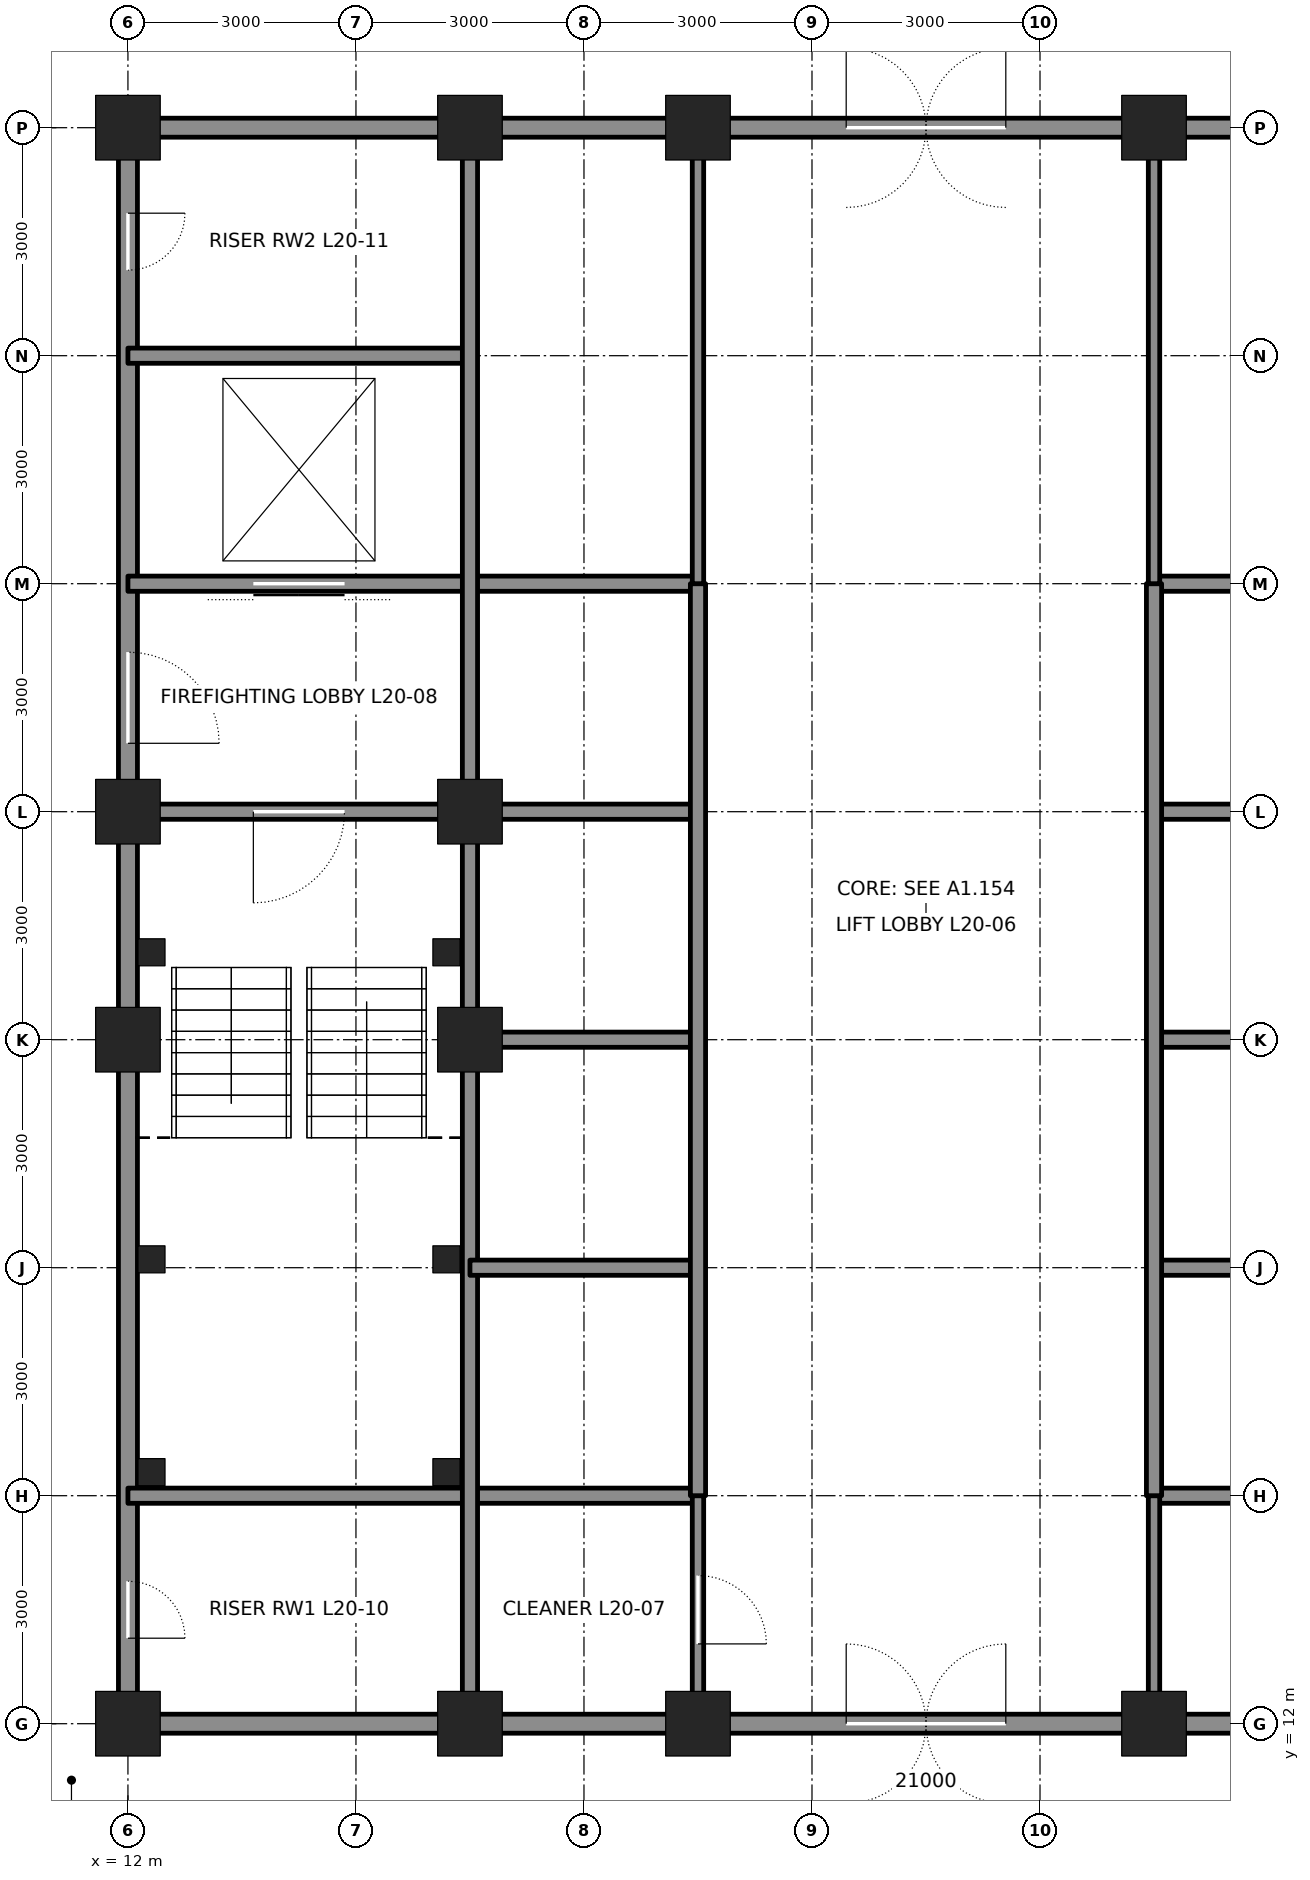
"""IFC4 building model, lengths in metres.
Left out: names, types, materials, properties, quantities, classifications, styles, units other than length and angle.
Written with IfcOpenShell. Run it as: python <this file> out.ifc"""

import sys

from ifc_helpers import new_model, si_unit, direction, frame, frame_2d, origin, origin_2d, place, context, subcontext, project, spatial, rectangle, hollow_rectangle, extrude, element, fill, save


model = new_model("IFC4")
c1 = context("Model", 3, precision=1e-05, world=origin(), true_north=direction((0.0, 1.0)))
c2 = subcontext(c1, "Body", "Model", "MODEL_VIEW")
j1 = project(units=[si_unit("LENGTHUNIT", "METRE"), si_unit("PLANEANGLEUNIT", "RADIAN")], contexts=[c1])
p1 = place(None, origin())
s1 = spatial("IfcSite", under=j1, at=p1, CompositionType="ELEMENT")
p2 = place(p1, origin())
s2 = spatial("IfcBuilding", under=s1, at=p2, CompositionType="ELEMENT")
p3 = place(p2, frame((0.0, 0.0, 96.3)))
s3 = spatial("IfcBuildingStorey", under=s2, at=p3, CompositionType="ELEMENT", Elevation=96.3)
for number, where, z_axis, x_axis in (
    (1, (12.0, 12.0, 0.0), (0.0, 0.0, 1.0), (1.0, 0.0, 0.0)),
    (2, (16.5, 12.0, 0.0), (0.0, 0.0, 1.0), (1.0, 0.0, 0.0)),
    (3, (19.5, 12.0, 0.0), (0.0, 0.0, 1.0), (1.0, 0.0, 0.0)),
    (4, (25.5, 12.0, 0.0), (0.0, 0.0, 1.0), (1.0, 0.0, 0.0)),
    (5, (12.0, 33.0, 0.0), (0.0, 0.0, 1.0), (1.0, 0.0, 0.0)),
    (6, (16.5, 33.0, 0.0), (0.0, 0.0, 1.0), (1.0, 0.0, 0.0)),
    (7, (19.5, 33.0, 0.0), (0.0, 0.0, 1.0), (1.0, 0.0, 0.0)),
    (8, (25.5, 33.0, 0.0), (0.0, 0.0, 1.0), (1.0, 0.0, 0.0)),
    (9, (12.0, 21.0, 0.0), (0.0, 0.0, 1.0), (1.0, 0.0, 0.0)),
    (10, (12.0, 24.0, 0.0), (0.0, 0.0, 1.0), (1.0, 0.0, 0.0)),
    (11, (16.5, 21.0, 0.0), (0.0, 0.0, 1.0), (1.0, 0.0, 0.0)),
    (12, (16.5, 24.0, 0.0), (0.0, 0.0, 1.0), (1.0, 0.0, 0.0)),
):
    element("IfcColumn", number, at=place(p3, frame(where, z_axis=z_axis, x_axis=x_axis)), inside=s3, PredefinedType="COLUMN", context=c2, shape_type="SweptSolid", body=[
        extrude(hollow_rectangle(XDim=0.85, YDim=0.85, WallThickness=0.085, at=origin_2d()), origin(), (0.0, 0.0, 1.0), 6.0),
    ])
p4 = place(p3, frame((12.0, 12.25, 0.0), z_axis=(0.0, 0.0, 1.0), x_axis=(0.0, 1.0, 0.0)))
e13 = element("IfcWall", 13, at=p4, inside=s3, PredefinedType="SOLIDWALL", context=c2, shape_type="SweptSolid", body=[
    extrude(rectangle(XDim=8.5, YDim=0.25, at=frame_2d((4.25, 0.0))), origin(), (0.0, 0.0, 1.0), 4.913),
])
p5 = place(p4, frame((0.875, 0.0, 0.0)))
e14 = element("IfcOpeningElement", 14, at=p5, cuts=e13, PredefinedType="OPENING", context=c2, shape_type="SweptSolid", body=[
    extrude(rectangle(XDim=0.75, YDim=2.1, at=frame_2d((0.375, 1.05))), frame((0.0, 0.135, 0.0), z_axis=(0.0, -1.0, 0.0), x_axis=(1.0, 0.0, 0.0)), (0.0, 0.0, 1.0), 0.27),
])
p6 = place(p3, frame((12.0, 21.25, 0.0), z_axis=(0.0, 0.0, 1.0), x_axis=(0.0, 1.0, 0.0)))
e15 = element("IfcWall", 15, at=p6, inside=s3, PredefinedType="SOLIDWALL", context=c2, shape_type="SweptSolid", body=[
    extrude(rectangle(XDim=2.5, YDim=0.25, at=frame_2d((1.25, 0.0))), origin(), (0.0, 0.0, 1.0), 4.913),
])
p7 = place(p3, frame((12.0, 24.25, 0.0), z_axis=(0.0, 0.0, 1.0), x_axis=(0.0, 1.0, 0.0)))
e16 = element("IfcWall", 16, at=p7, inside=s3, PredefinedType="SOLIDWALL", context=c2, shape_type="SweptSolid", body=[
    extrude(rectangle(XDim=8.5, YDim=0.25, at=frame_2d((4.25, 0.0))), origin(), (0.0, 0.0, 1.0), 4.913),
])
p8 = place(p7, frame((0.65, 0.0, 0.0)))
e17 = element("IfcOpeningElement", 17, at=p8, cuts=e16, PredefinedType="OPENING", context=c2, shape_type="SweptSolid", body=[
    extrude(rectangle(XDim=1.2, YDim=2.1, at=frame_2d((0.6, 1.05))), frame((0.0, 0.135, 0.0), z_axis=(0.0, -1.0, 0.0), x_axis=(1.0, 0.0, 0.0)), (0.0, 0.0, 1.0), 0.27),
])
p9 = place(p7, frame((6.875, 0.0, 0.0)))
e18 = element("IfcOpeningElement", 18, at=p9, cuts=e16, PredefinedType="OPENING", context=c2, shape_type="SweptSolid", body=[
    extrude(rectangle(XDim=0.75, YDim=2.1, at=frame_2d((0.375, 1.05))), frame((0.0, 0.135, 0.0), z_axis=(0.0, -1.0, 0.0), x_axis=(1.0, 0.0, 0.0)), (0.0, 0.0, 1.0), 0.27),
])
p10 = place(p3, frame((12.25, 12.0, 0.0), z_axis=(0.0, 0.0, 1.0), x_axis=(1.0, 0.0, 0.0)))
e19 = element("IfcWall", 19, at=p10, inside=s3, PredefinedType="SOLIDWALL", context=c2, shape_type="SweptSolid", body=[
    extrude(rectangle(XDim=4.0, YDim=0.25, at=frame_2d((2.0, 0.0))), origin(), (0.0, 0.0, 1.0), 4.981),
])
for number, where, z_axis, x_axis in (
    (20, (16.75, 12.0, 0.0), (0.0, 0.0, 1.0), (1.0, 0.0, 0.0)),
    (21, (25.75, 12.0, 0.0), (0.0, 0.0, 1.0), (1.0, 0.0, 0.0)),
):
    element("IfcWall", number, at=place(p3, frame(where, z_axis=z_axis, x_axis=x_axis)), inside=s3, PredefinedType="SOLIDWALL", context=c2, shape_type="SweptSolid", body=[
        extrude(rectangle(XDim=2.5, YDim=0.25, at=frame_2d((1.25, 0.0))), origin(), (0.0, 0.0, 1.0), 4.981),
    ])
for number, where, z_axis, x_axis in (
    (22, (12.0, 15.0, 0.0), (0.0, 0.0, 1.0), (1.0, 0.0, 0.0)),
    (23, (25.5, 15.0, 0.0), (0.0, 0.0, 1.0), (1.0, 0.0, 0.0)),
):
    element("IfcWall", number, at=place(p3, frame(where, z_axis=z_axis, x_axis=x_axis)), inside=s3, PredefinedType="SOLIDWALL", context=c2, shape_type="SweptSolid", body=[
        extrude(rectangle(XDim=7.5, YDim=0.2, at=frame_2d((3.75, 0.0))), origin(), (0.0, 0.0, 1.0), 5.84),
    ])
p11 = place(p3, frame((12.25, 24.0, 0.0), z_axis=(0.0, 0.0, 1.0), x_axis=(1.0, 0.0, 0.0)))
e24 = element("IfcWall", 24, at=p11, inside=s3, PredefinedType="SOLIDWALL", context=c2, shape_type="SweptSolid", body=[
    extrude(rectangle(XDim=4.0, YDim=0.2, at=frame_2d((2.0, 0.0))), origin(), (0.0, 0.0, 1.0), 4.89),
])
p12 = place(p11, frame((1.4, 0.0, 0.0)))
e25 = element("IfcOpeningElement", 25, at=p12, cuts=e24, PredefinedType="OPENING", context=c2, shape_type="SweptSolid", body=[
    extrude(rectangle(XDim=1.2, YDim=2.1, at=frame_2d((0.6, 1.05))), frame((0.0, 0.11, 0.0), z_axis=(0.0, -1.0, 0.0), x_axis=(1.0, 0.0, 0.0)), (0.0, 0.0, 1.0), 0.22),
])
for number, where, z_axis, x_axis in (
    (26, (16.75, 24.0, 0.0), (0.0, 0.0, 1.0), (1.0, 0.0, 0.0)),
    (27, (25.5, 24.0, 0.0), (0.0, 0.0, 1.0), (1.0, 0.0, 0.0)),
):
    element("IfcWall", number, at=place(p3, frame(where, z_axis=z_axis, x_axis=x_axis)), inside=s3, PredefinedType="SOLIDWALL", context=c2, shape_type="SweptSolid", body=[
        extrude(rectangle(XDim=2.75, YDim=0.2, at=frame_2d((1.375, 0.0))), origin(), (0.0, 0.0, 1.0), 4.89),
    ])
p13 = place(p3, frame((12.0, 27.0, 0.0), z_axis=(0.0, 0.0, 1.0), x_axis=(1.0, 0.0, 0.0)))
e28 = element("IfcWall", 28, at=p13, inside=s3, PredefinedType="SOLIDWALL", context=c2, shape_type="SweptSolid", body=[
    extrude(rectangle(XDim=7.5, YDim=0.2, at=frame_2d((3.75, 0.0))), origin(), (0.0, 0.0, 1.0), 5.84),
])
p14 = place(p13, frame((1.65, 0.0, 0.0)))
e29 = element("IfcOpeningElement", 29, at=p14, cuts=e28, PredefinedType="OPENING", context=c2, shape_type="SweptSolid", body=[
    extrude(rectangle(XDim=1.2, YDim=2.1, at=frame_2d((0.6, 1.05))), frame((0.0, 0.11, 0.0), z_axis=(0.0, -1.0, 0.0), x_axis=(1.0, 0.0, 0.0)), (0.0, 0.0, 1.0), 0.22),
])
p15 = place(p3, frame((25.5, 27.0, 0.0), z_axis=(0.0, 0.0, 1.0), x_axis=(1.0, 0.0, 0.0)))
e30 = element("IfcWall", 30, at=p15, inside=s3, PredefinedType="SOLIDWALL", context=c2, shape_type="SweptSolid", body=[
    extrude(rectangle(XDim=3.0, YDim=0.2, at=frame_2d((1.5, 0.0))), origin(), (0.0, 0.0, 1.0), 5.84),
])
p16 = place(p3, frame((12.0, 30.0, 0.0), z_axis=(0.0, 0.0, 1.0), x_axis=(1.0, 0.0, 0.0)))
e31 = element("IfcWall", 31, at=p16, inside=s3, PredefinedType="SOLIDWALL", context=c2, shape_type="SweptSolid", body=[
    extrude(rectangle(XDim=4.5, YDim=0.2, at=frame_2d((2.25, 0.0))), origin(), (0.0, 0.0, 1.0), 5.84),
])
p17 = place(p3, frame((12.25, 33.0, 0.0), z_axis=(0.0, 0.0, 1.0), x_axis=(1.0, 0.0, 0.0)))
e32 = element("IfcWall", 32, at=p17, inside=s3, PredefinedType="SOLIDWALL", context=c2, shape_type="SweptSolid", body=[
    extrude(rectangle(XDim=4.0, YDim=0.25, at=frame_2d((2.0, 0.0))), origin(), (0.0, 0.0, 1.0), 4.981),
])
for number, where, z_axis, x_axis in (
    (33, (16.75, 33.0, 0.0), (0.0, 0.0, 1.0), (1.0, 0.0, 0.0)),
    (34, (25.75, 33.0, 0.0), (0.0, 0.0, 1.0), (1.0, 0.0, 0.0)),
):
    element("IfcWall", number, at=place(p3, frame(where, z_axis=z_axis, x_axis=x_axis)), inside=s3, PredefinedType="SOLIDWALL", context=c2, shape_type="SweptSolid", body=[
        extrude(rectangle(XDim=2.5, YDim=0.25, at=frame_2d((1.25, 0.0))), origin(), (0.0, 0.0, 1.0), 4.981),
    ])
p18 = place(p3, frame((16.5, 12.25, 0.0), z_axis=(0.0, 0.0, 1.0), x_axis=(0.0, 1.0, 0.0)))
e35 = element("IfcWall", 35, at=p18, inside=s3, PredefinedType="SOLIDWALL", context=c2, shape_type="SweptSolid", body=[
    extrude(rectangle(XDim=8.5, YDim=0.2, at=frame_2d((4.25, 0.0))), origin(), (0.0, 0.0, 1.0), 4.913),
])
p19 = place(p3, frame((16.5, 21.25, 0.0), z_axis=(0.0, 0.0, 1.0), x_axis=(0.0, 1.0, 0.0)))
e36 = element("IfcWall", 36, at=p19, inside=s3, PredefinedType="SOLIDWALL", context=c2, shape_type="SweptSolid", body=[
    extrude(rectangle(XDim=2.5, YDim=0.2, at=frame_2d((1.25, 0.0))), origin(), (0.0, 0.0, 1.0), 4.913),
])
p20 = place(p3, frame((16.5, 24.25, 0.0), z_axis=(0.0, 0.0, 1.0), x_axis=(0.0, 1.0, 0.0)))
e37 = element("IfcWall", 37, at=p20, inside=s3, PredefinedType="SOLIDWALL", context=c2, shape_type="SweptSolid", body=[
    extrude(rectangle(XDim=8.5, YDim=0.2, at=frame_2d((4.25, 0.0))), origin(), (0.0, 0.0, 1.0), 4.913),
])
p21 = place(p3, frame((16.5, 18.0, 0.0), z_axis=(0.0, 0.0, 1.0), x_axis=(1.0, 0.0, 0.0)))
e38 = element("IfcWall", 38, at=p21, inside=s3, PredefinedType="SOLIDWALL", context=c2, shape_type="SweptSolid", body=[
    extrude(rectangle(XDim=3.0, YDim=0.2, at=frame_2d((1.5, 0.0))), origin(), (0.0, 0.0, 1.0), 5.84),
])
p22 = place(p3, frame((25.5, 18.0, 0.0), z_axis=(0.0, 0.0, 1.0), x_axis=(1.0, 0.0, 0.0)))
e39 = element("IfcWall", 39, at=p22, inside=s3, PredefinedType="SOLIDWALL", context=c2, shape_type="SweptSolid", body=[
    extrude(rectangle(XDim=7.5, YDim=0.2, at=frame_2d((3.75, 0.0))), origin(), (0.0, 0.0, 1.0), 5.84),
])
p23 = place(p22, frame((4.65, 0.0, 0.0)))
e40 = element("IfcOpeningElement", 40, at=p23, cuts=e39, PredefinedType="OPENING", context=c2, shape_type="SweptSolid", body=[
    extrude(rectangle(XDim=1.2, YDim=2.1, at=frame_2d((0.6, 1.05))), frame((0.0, 0.11, 0.0), z_axis=(0.0, -1.0, 0.0), x_axis=(1.0, 0.0, 0.0)), (0.0, 0.0, 1.0), 0.22),
])
for number, where, z_axis, x_axis in (
    (41, (16.75, 21.0, 0.0), (0.0, 0.0, 1.0), (1.0, 0.0, 0.0)),
    (42, (25.5, 21.0, 0.0), (0.0, 0.0, 1.0), (1.0, 0.0, 0.0)),
):
    element("IfcWall", number, at=place(p3, frame(where, z_axis=z_axis, x_axis=x_axis)), inside=s3, PredefinedType="SOLIDWALL", context=c2, shape_type="SweptSolid", body=[
        extrude(rectangle(XDim=2.75, YDim=0.2, at=frame_2d((1.375, 0.0))), origin(), (0.0, 0.0, 1.0), 4.89),
    ])
p24 = place(p3, frame((19.5, 12.25, 0.0), z_axis=(0.0, 0.0, 1.0), x_axis=(0.0, 1.0, 0.0)))
e43 = element("IfcWall", 43, at=p24, inside=s3, PredefinedType="PARTITIONING", context=c2, shape_type="SweptSolid", body=[
    extrude(rectangle(XDim=2.75, YDim=0.15, at=frame_2d((1.375, 0.0))), origin(), (0.0, 0.0, 1.0), 4.865),
])
p25 = place(p24, frame((0.8, 0.0, 0.0)))
e44 = element("IfcOpeningElement", 44, at=p25, cuts=e43, PredefinedType="OPENING", context=c2, shape_type="SweptSolid", body=[
    extrude(rectangle(XDim=0.9, YDim=2.1, at=frame_2d((0.45, 1.05))), frame((0.0, 0.085, 0.0), z_axis=(0.0, -1.0, 0.0), x_axis=(1.0, 0.0, 0.0)), (0.0, 0.0, 1.0), 0.17),
])
p26 = place(p3, frame((19.5, 15.0, 0.0), z_axis=(0.0, 0.0, 1.0), x_axis=(0.0, 1.0, 0.0)))
e45 = element("IfcWall", 45, at=p26, inside=s3, PredefinedType="SOLIDWALL", context=c2, shape_type="SweptSolid", body=[
    extrude(rectangle(XDim=12.0, YDim=0.2, at=frame_2d((6.0, 0.0))), origin(), (0.0, 0.0, 1.0), 4.865),
])
p27 = place(p3, frame((19.5, 27.0, 0.0), z_axis=(0.0, 0.0, 1.0), x_axis=(0.0, 1.0, 0.0)))
e46 = element("IfcWall", 46, at=p27, inside=s3, PredefinedType="PARTITIONING", context=c2, shape_type="SweptSolid", body=[
    extrude(rectangle(XDim=5.75, YDim=0.15, at=frame_2d((2.875, 0.0))), origin(), (0.0, 0.0, 1.0), 4.865),
])
p28 = place(p3, frame((25.5, 12.25, 0.0), z_axis=(0.0, 0.0, 1.0), x_axis=(0.0, 1.0, 0.0)))
e47 = element("IfcWall", 47, at=p28, inside=s3, PredefinedType="PARTITIONING", context=c2, shape_type="SweptSolid", body=[
    extrude(rectangle(XDim=2.75, YDim=0.15, at=frame_2d((1.375, 0.0))), origin(), (0.0, 0.0, 1.0), 4.865),
])
p29 = place(p3, frame((25.5, 15.0, 0.0), z_axis=(0.0, 0.0, 1.0), x_axis=(0.0, 1.0, 0.0)))
e48 = element("IfcWall", 48, at=p29, inside=s3, PredefinedType="SOLIDWALL", context=c2, shape_type="SweptSolid", body=[
    extrude(rectangle(XDim=12.0, YDim=0.2, at=frame_2d((6.0, 0.0))), origin(), (0.0, 0.0, 1.0), 4.865),
])
p30 = place(p3, frame((25.5, 27.0, 0.0), z_axis=(0.0, 0.0, 1.0), x_axis=(0.0, 1.0, 0.0)))
e49 = element("IfcWall", 49, at=p30, inside=s3, PredefinedType="PARTITIONING", context=c2, shape_type="SweptSolid", body=[
    extrude(rectangle(XDim=5.75, YDim=0.15, at=frame_2d((2.875, 0.0))), origin(), (0.0, 0.0, 1.0), 4.865),
])
p31 = place(p3, frame((19.5, 12.0, 0.0), z_axis=(0.0, 0.0, 1.0), x_axis=(1.0, 0.0, 0.0)))
e50 = element("IfcWall", 50, at=p31, inside=s3, PredefinedType="SOLIDWALL", context=c2, shape_type="SweptSolid", body=[
    extrude(rectangle(XDim=6.0, YDim=0.25, at=frame_2d((3.0, 0.0))), origin(), (0.0, 0.0, 1.0), 4.981),
])
p32 = place(p31, frame((1.95, 0.0, 0.0)))
e51 = element("IfcOpeningElement", 51, at=p32, cuts=e50, PredefinedType="OPENING", context=c2, shape_type="SweptSolid", body=[
    extrude(rectangle(XDim=2.1, YDim=2.4, at=frame_2d((1.05, 1.2))), frame((0.0, 0.135, 0.0), z_axis=(0.0, -1.0, 0.0), x_axis=(1.0, 0.0, 0.0)), (0.0, 0.0, 1.0), 0.27),
])
p33 = place(p3, frame((19.5, 33.0, 0.0), z_axis=(0.0, 0.0, 1.0), x_axis=(1.0, 0.0, 0.0)))
e52 = element("IfcWall", 52, at=p33, inside=s3, PredefinedType="SOLIDWALL", context=c2, shape_type="SweptSolid", body=[
    extrude(rectangle(XDim=6.0, YDim=0.25, at=frame_2d((3.0, 0.0))), origin(), (0.0, 0.0, 1.0), 4.981),
])
p34 = place(p33, frame((1.95, 0.0, 0.0)))
e53 = element("IfcOpeningElement", 53, at=p34, cuts=e52, PredefinedType="OPENING", context=c2, shape_type="SweptSolid", body=[
    extrude(rectangle(XDim=2.1, YDim=2.4, at=frame_2d((1.05, 1.2))), frame((0.0, 0.135, 0.0), z_axis=(0.0, -1.0, 0.0), x_axis=(1.0, 0.0, 0.0)), (0.0, 0.0, 1.0), 0.27),
])
for number, where, z_axis, x_axis in (
    (54, (12.31, 15.31, 0.0), (0.0, 0.0, 1.0), (1.0, 0.0, 0.0)),
    (55, (16.19, 15.31, 0.0), (0.0, 0.0, 1.0), (1.0, 0.0, 0.0)),
    (56, (12.31, 18.11, 0.0), (0.0, 0.0, 1.0), (1.0, 0.0, 0.0)),
    (57, (16.19, 18.11, 0.0), (0.0, 0.0, 1.0), (1.0, 0.0, 0.0)),
    (58, (12.31, 22.15, 0.0), (0.0, 0.0, 1.0), (1.0, 0.0, 0.0)),
    (59, (16.19, 22.15, 0.0), (0.0, 0.0, 1.0), (1.0, 0.0, 0.0)),
):
    element("IfcColumn", number, at=place(p3, frame(where, z_axis=z_axis, x_axis=x_axis)), inside=s3, PredefinedType="COLUMN", context=c2, shape_type="SweptSolid", body=[
        extrude(hollow_rectangle(XDim=0.356, YDim=0.356, WallThickness=0.015, at=origin_2d()), origin(), (0.0, 0.0, 1.0), 6.0),
    ])
p35 = place(p32, origin())
e60 = element("IfcDoor", 60, at=p35, inside=s3, OperationType="DOUBLE_DOOR_DOUBLE_SWING", PredefinedType="DOOR", context=c2, shape_type="SweptSolid", body=[
    extrude(rectangle(XDim=2.1, YDim=2.4, at=frame_2d((1.05, 1.2))), frame((0.0, 0.025, 0.0), z_axis=(0.0, -1.0, 0.0), x_axis=(1.0, 0.0, 0.0)), (0.0, 0.0, 1.0), 0.05),
])
fill(e51, e60)
p36 = place(p34, origin())
e61 = element("IfcDoor", 61, at=p36, inside=s3, OperationType="DOUBLE_DOOR_DOUBLE_SWING", PredefinedType="DOOR", context=c2, shape_type="SweptSolid", body=[
    extrude(rectangle(XDim=2.1, YDim=2.4, at=frame_2d((1.05, 1.2))), frame((0.0, 0.025, 0.0), z_axis=(0.0, -1.0, 0.0), x_axis=(1.0, 0.0, 0.0)), (0.0, 0.0, 1.0), 0.05),
])
fill(e53, e61)
p37 = place(p12, frame((1.2, 0.0, 0.0), z_axis=(0.0, 0.0, 1.0), x_axis=(-1.0, 0.0, 0.0)))
e62 = element("IfcDoor", 62, at=p37, inside=s3, OperationType="SINGLE_SWING_RIGHT", PredefinedType="DOOR", context=c2, shape_type="SweptSolid", body=[
    extrude(rectangle(XDim=1.2, YDim=2.1, at=frame_2d((0.6, 1.05))), frame((0.0, 0.025, 0.0), z_axis=(0.0, -1.0, 0.0), x_axis=(1.0, 0.0, 0.0)), (0.0, 0.0, 1.0), 0.05),
])
fill(e25, e62)
p38 = place(p8, frame((1.2, 0.0, 0.0), z_axis=(0.0, 0.0, 1.0), x_axis=(-1.0, 0.0, 0.0)))
e63 = element("IfcDoor", 63, at=p38, inside=s3, OperationType="SINGLE_SWING_RIGHT", PredefinedType="DOOR", context=c2, shape_type="SweptSolid", body=[
    extrude(rectangle(XDim=1.2, YDim=2.1, at=frame_2d((0.6, 1.05))), frame((0.0, 0.025, 0.0), z_axis=(0.0, -1.0, 0.0), x_axis=(1.0, 0.0, 0.0)), (0.0, 0.0, 1.0), 0.05),
])
fill(e17, e63)
p39 = place(p14, origin())
e64 = element("IfcDoor", 64, at=p39, inside=s3, OperationType="DOUBLE_DOOR_SLIDING", PredefinedType="DOOR", context=c2, shape_type="SweptSolid", body=[
    extrude(rectangle(XDim=1.2, YDim=2.1, at=frame_2d((0.6, 1.05))), frame((0.0, 0.025, 0.0), z_axis=(0.0, -1.0, 0.0), x_axis=(1.0, 0.0, 0.0)), (0.0, 0.0, 1.0), 0.05),
])
fill(e29, e64)
p40 = place(p5, frame((0.75, 0.0, 0.0), z_axis=(0.0, 0.0, 1.0), x_axis=(-1.0, 0.0, 0.0)))
e65 = element("IfcDoor", 65, at=p40, inside=s3, OperationType="SINGLE_SWING_RIGHT", PredefinedType="DOOR", context=c2, shape_type="SweptSolid", body=[
    extrude(rectangle(XDim=0.75, YDim=2.1, at=frame_2d((0.375, 1.05))), frame((0.0, 0.025, 0.0), z_axis=(0.0, -1.0, 0.0), x_axis=(1.0, 0.0, 0.0)), (0.0, 0.0, 1.0), 0.05),
])
fill(e14, e65)
p41 = place(p9, frame((0.75, 0.0, 0.0), z_axis=(0.0, 0.0, 1.0), x_axis=(-1.0, 0.0, 0.0)))
e66 = element("IfcDoor", 66, at=p41, inside=s3, OperationType="SINGLE_SWING_LEFT", PredefinedType="DOOR", context=c2, shape_type="SweptSolid", body=[
    extrude(rectangle(XDim=0.75, YDim=2.1, at=frame_2d((0.375, 1.05))), frame((0.0, 0.025, 0.0), z_axis=(0.0, -1.0, 0.0), x_axis=(1.0, 0.0, 0.0)), (0.0, 0.0, 1.0), 0.05),
])
fill(e18, e66)
p42 = place(p25, frame((0.9, 0.0, 0.0), z_axis=(0.0, 0.0, 1.0), x_axis=(-1.0, 0.0, 0.0)))
e67 = element("IfcDoor", 67, at=p42, inside=s3, OperationType="SINGLE_SWING_RIGHT", PredefinedType="DOOR", context=c2, shape_type="SweptSolid", body=[
    extrude(rectangle(XDim=0.9, YDim=2.1, at=frame_2d((0.45, 1.05))), frame((0.0, 0.025, 0.0), z_axis=(0.0, -1.0, 0.0), x_axis=(1.0, 0.0, 0.0)), (0.0, 0.0, 1.0), 0.05),
])
fill(e44, e67)
save(model, sys.argv[1])
